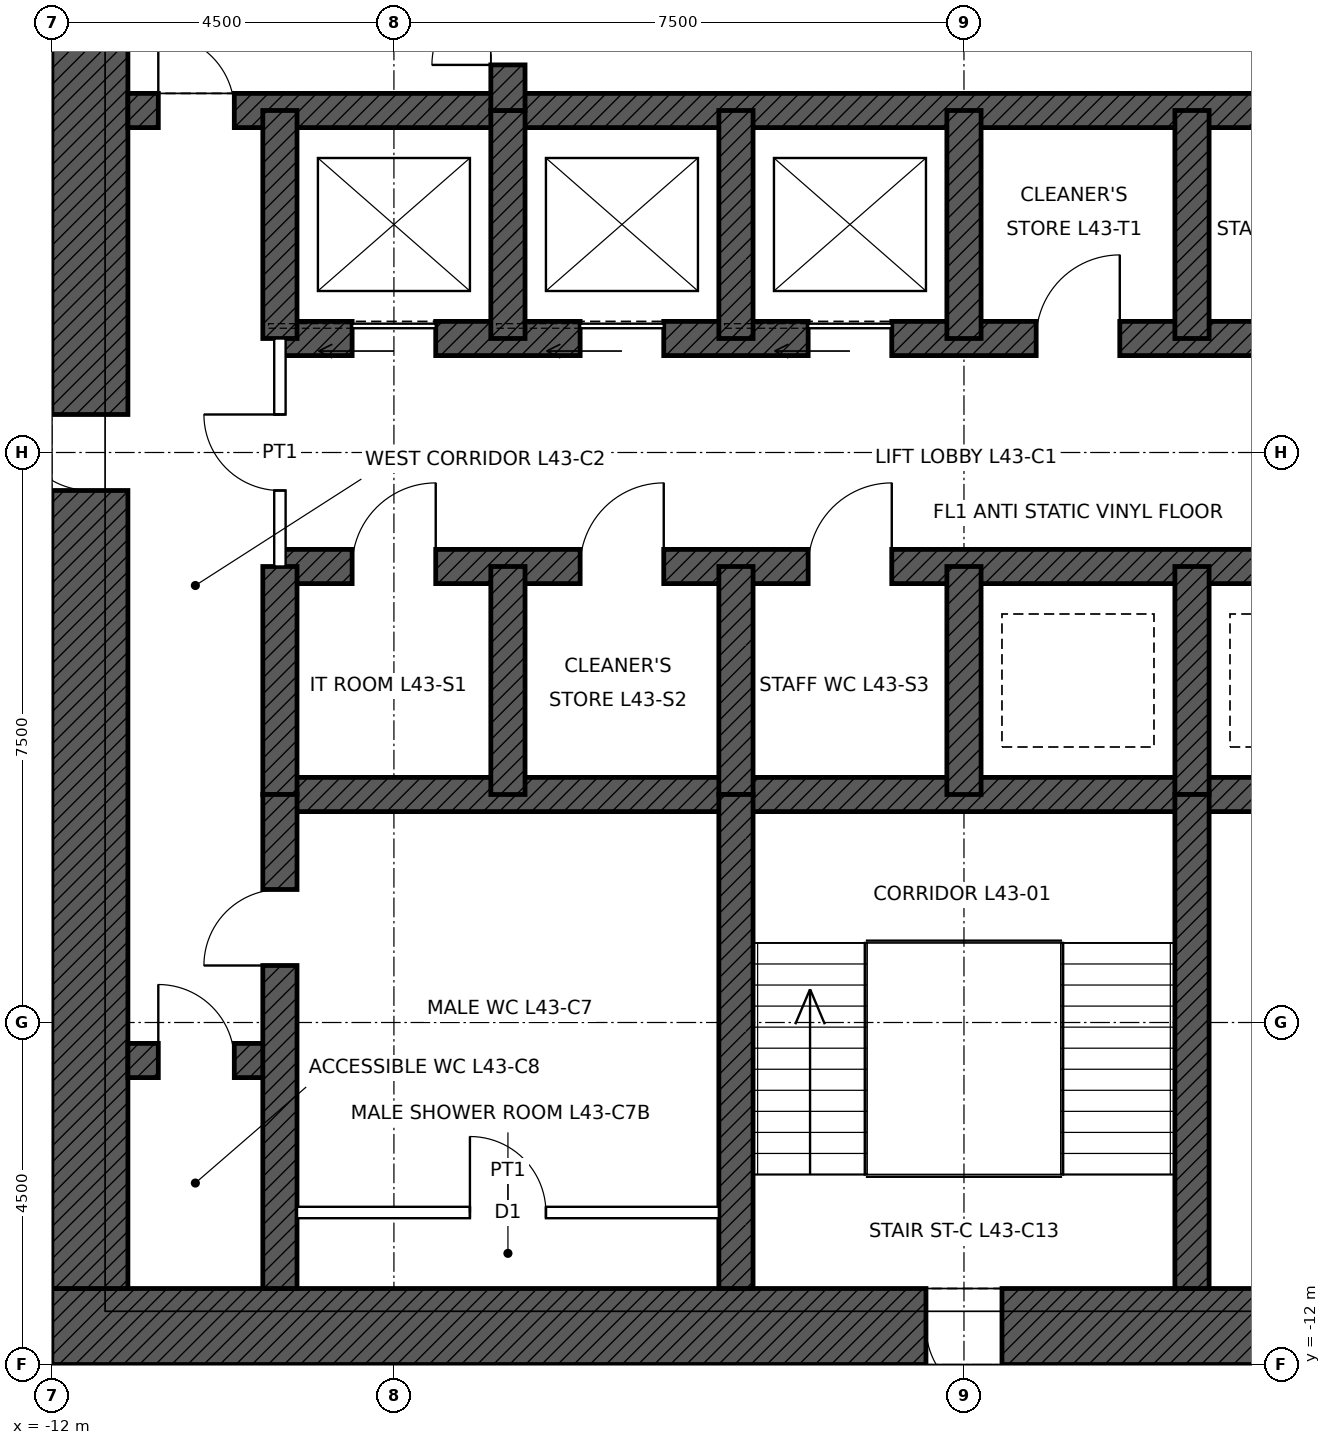
"""IFC4 building model, lengths in metres.
Left out: names, types, materials, properties, quantities, classifications, styles, units other than length and angle.
Written with IfcOpenShell. Run it as: python <this file> out.ifc"""

import sys

from ifc_helpers import new_model, si_unit, direction, frame, frame_2d, origin, place, context, subcontext, project, spatial, rectangle, extrude, element, fill, save


model = new_model("IFC4")
c1 = context("Model", 3, precision=1e-05, world=origin(), true_north=direction((0.0, 1.0)))
c2 = subcontext(c1, "Body", "Model", "MODEL_VIEW")
j1 = project(units=[si_unit("LENGTHUNIT", "METRE"), si_unit("PLANEANGLEUNIT", "RADIAN")], contexts=[c1])
p1 = place(None, origin())
s1 = spatial("IfcSite", under=j1, at=p1, CompositionType="ELEMENT")
p2 = place(p1, origin())
s2 = spatial("IfcBuilding", under=s1, at=p2, CompositionType="ELEMENT")
p3 = place(p2, frame((0.0, 0.0, 205.9)))
s3 = spatial("IfcBuildingStorey", under=s2, at=p3, CompositionType="ELEMENT", Elevation=205.9)
p4 = place(p3, frame((12.0, -11.5, 0.0), z_axis=(0.0, 0.0, 1.0), x_axis=(-1.0, 0.0, 0.0)))
e1 = element("IfcWall", 1, at=p4, inside=s3, PredefinedType="SHEAR", context=c2, shape_type="SweptSolid", body=[
    extrude(rectangle(XDim=24.0, YDim=1.0, at=frame_2d((12.0, 0.0))), origin(), (0.0, 0.0, 1.0), 4.0),
])
p5 = place(p4, frame((11.5, 0.0, 0.0)))
e2 = element("IfcOpeningElement", 2, at=p5, cuts=e1, PredefinedType="OPENING", context=c2, shape_type="SweptSolid", body=[
    extrude(rectangle(XDim=1.0, YDim=2.1, at=frame_2d((0.5, 1.05))), frame((0.0, 0.51, 0.0), z_axis=(0.0, -1.0, 0.0), x_axis=(1.0, 0.0, 0.0)), (0.0, 0.0, 1.0), 1.02),
])
p6 = place(p4, frame((1.0, 0.0, 0.0)))
e3 = element("IfcOpeningElement", 3, at=p6, cuts=e1, PredefinedType="OPENING", context=c2, shape_type="SweptSolid", body=[
    extrude(rectangle(XDim=1.0, YDim=2.4, at=frame_2d((0.5, 1.2))), frame((0.0, 0.51, 0.0), z_axis=(0.0, -1.0, 0.0), x_axis=(1.0, 0.0, 0.0)), (0.0, 0.0, 1.0), 1.02),
])
p7 = place(p3, frame((-11.5, -11.0, 0.0), z_axis=(0.0, 0.0, 1.0), x_axis=(0.0, 1.0, 0.0)))
e4 = element("IfcWall", 4, at=p7, inside=s3, PredefinedType="SHEAR", context=c2, shape_type="SweptSolid", body=[
    extrude(rectangle(XDim=22.0, YDim=1.0, at=frame_2d((11.0, 0.0))), origin(), (0.0, 0.0, 1.0), 4.0),
])
p8 = place(p7, frame((10.5, 0.0, 0.0)))
e5 = element("IfcOpeningElement", 5, at=p8, cuts=e4, PredefinedType="OPENING", context=c2, shape_type="SweptSolid", body=[
    extrude(rectangle(XDim=1.0, YDim=2.4, at=frame_2d((0.5, 1.2))), frame((0.0, 0.51, 0.0), z_axis=(0.0, -1.0, 0.0), x_axis=(1.0, 0.0, 0.0)), (0.0, 0.0, 1.0), 1.02),
])
p9 = place(p3, frame((-11.0, 4.5, 0.0), z_axis=(0.0, 0.0, 1.0), x_axis=(1.0, 0.0, 0.0)))
e6 = element("IfcWall", 6, at=p9, inside=s3, PredefinedType="SHEAR", context=c2, shape_type="SweptSolid", body=[
    extrude(rectangle(XDim=22.0, YDim=0.45, at=frame_2d((11.0, 0.0))), origin(), (0.0, 0.0, 1.0), 4.0),
])
p10 = place(p9, frame((0.4, 0.0, 0.0)))
e7 = element("IfcOpeningElement", 7, at=p10, cuts=e6, PredefinedType="OPENING", context=c2, shape_type="SweptSolid", body=[
    extrude(rectangle(XDim=1.0, YDim=2.1, at=frame_2d((0.5, 1.05))), frame((0.0, 0.235, 0.0), z_axis=(0.0, -1.0, 0.0), x_axis=(1.0, 0.0, 0.0)), (0.0, 0.0, 1.0), 0.47),
])
p11 = place(p9, frame((20.6, 0.0, 0.0)))
e8 = element("IfcOpeningElement", 8, at=p11, cuts=e6, PredefinedType="OPENING", context=c2, shape_type="SweptSolid", body=[
    extrude(rectangle(XDim=1.0, YDim=2.1, at=frame_2d((0.5, 1.05))), frame((0.0, 0.235, 0.0), z_axis=(0.0, -1.0, 0.0), x_axis=(1.0, 0.0, 0.0)), (0.0, 0.0, 1.0), 0.47),
])
p12 = place(p3, frame((-9.0, 1.5, 0.0), z_axis=(0.0, 0.0, 1.0), x_axis=(1.0, 0.0, 0.0)))
e9 = element("IfcWall", 9, at=p12, inside=s3, PredefinedType="SHEAR", context=c2, shape_type="SweptSolid", body=[
    extrude(rectangle(XDim=18.0, YDim=0.45, at=frame_2d((9.0, 0.0))), origin(), (0.0, 0.0, 1.0), 4.0),
])
p13 = place(p12, frame((0.95, 0.0, 0.0)))
e10 = element("IfcOpeningElement", 10, at=p13, cuts=e9, PredefinedType="OPENING", context=c2, shape_type="SweptSolid", body=[
    extrude(rectangle(XDim=1.1, YDim=2.1, at=frame_2d((0.55, 1.05))), frame((0.0, 0.235, 0.0), z_axis=(0.0, -1.0, 0.0), x_axis=(1.0, 0.0, 0.0)), (0.0, 0.0, 1.0), 0.47),
])
p14 = place(p12, frame((3.95, 0.0, 0.0)))
e11 = element("IfcOpeningElement", 11, at=p14, cuts=e9, PredefinedType="OPENING", context=c2, shape_type="SweptSolid", body=[
    extrude(rectangle(XDim=1.1, YDim=2.1, at=frame_2d((0.55, 1.05))), frame((0.0, 0.235, 0.0), z_axis=(0.0, -1.0, 0.0), x_axis=(1.0, 0.0, 0.0)), (0.0, 0.0, 1.0), 0.47),
])
p15 = place(p12, frame((6.95, 0.0, 0.0)))
e12 = element("IfcOpeningElement", 12, at=p15, cuts=e9, PredefinedType="OPENING", context=c2, shape_type="SweptSolid", body=[
    extrude(rectangle(XDim=1.1, YDim=2.1, at=frame_2d((0.55, 1.05))), frame((0.0, 0.235, 0.0), z_axis=(0.0, -1.0, 0.0), x_axis=(1.0, 0.0, 0.0)), (0.0, 0.0, 1.0), 0.47),
])
p16 = place(p12, frame((9.95, 0.0, 0.0)))
e13 = element("IfcOpeningElement", 13, at=p16, cuts=e9, PredefinedType="OPENING", context=c2, shape_type="SweptSolid", body=[
    extrude(rectangle(XDim=1.1, YDim=2.1, at=frame_2d((0.55, 1.05))), frame((0.0, 0.235, 0.0), z_axis=(0.0, -1.0, 0.0), x_axis=(1.0, 0.0, 0.0)), (0.0, 0.0, 1.0), 0.47),
])
p17 = place(p12, frame((12.95, 0.0, 0.0)))
e14 = element("IfcOpeningElement", 14, at=p17, cuts=e9, PredefinedType="OPENING", context=c2, shape_type="SweptSolid", body=[
    extrude(rectangle(XDim=1.1, YDim=2.1, at=frame_2d((0.55, 1.05))), frame((0.0, 0.235, 0.0), z_axis=(0.0, -1.0, 0.0), x_axis=(1.0, 0.0, 0.0)), (0.0, 0.0, 1.0), 0.47),
])
p18 = place(p12, frame((15.95, 0.0, 0.0)))
e15 = element("IfcOpeningElement", 15, at=p18, cuts=e9, PredefinedType="OPENING", context=c2, shape_type="SweptSolid", body=[
    extrude(rectangle(XDim=1.1, YDim=2.1, at=frame_2d((0.55, 1.05))), frame((0.0, 0.235, 0.0), z_axis=(0.0, -1.0, 0.0), x_axis=(1.0, 0.0, 0.0)), (0.0, 0.0, 1.0), 0.47),
])
p19 = place(p3, frame((-9.0, -1.5, 0.0), z_axis=(0.0, 0.0, 1.0), x_axis=(1.0, 0.0, 0.0)))
e16 = element("IfcWall", 16, at=p19, inside=s3, PredefinedType="SHEAR", context=c2, shape_type="SweptSolid", body=[
    extrude(rectangle(XDim=18.0, YDim=0.45, at=frame_2d((9.0, 0.0))), origin(), (0.0, 0.0, 1.0), 4.0),
])
p20 = place(p19, frame((0.95, 0.0, 0.0)))
e17 = element("IfcOpeningElement", 17, at=p20, cuts=e16, PredefinedType="OPENING", context=c2, shape_type="SweptSolid", body=[
    extrude(rectangle(XDim=1.1, YDim=2.1, at=frame_2d((0.55, 1.05))), frame((0.0, 0.235, 0.0), z_axis=(0.0, -1.0, 0.0), x_axis=(1.0, 0.0, 0.0)), (0.0, 0.0, 1.0), 0.47),
])
p21 = place(p19, frame((3.95, 0.0, 0.0)))
e18 = element("IfcOpeningElement", 18, at=p21, cuts=e16, PredefinedType="OPENING", context=c2, shape_type="SweptSolid", body=[
    extrude(rectangle(XDim=1.1, YDim=2.1, at=frame_2d((0.55, 1.05))), frame((0.0, 0.235, 0.0), z_axis=(0.0, -1.0, 0.0), x_axis=(1.0, 0.0, 0.0)), (0.0, 0.0, 1.0), 0.47),
])
p22 = place(p19, frame((6.95, 0.0, 0.0)))
e19 = element("IfcOpeningElement", 19, at=p22, cuts=e16, PredefinedType="OPENING", context=c2, shape_type="SweptSolid", body=[
    extrude(rectangle(XDim=1.1, YDim=2.1, at=frame_2d((0.55, 1.05))), frame((0.0, 0.235, 0.0), z_axis=(0.0, -1.0, 0.0), x_axis=(1.0, 0.0, 0.0)), (0.0, 0.0, 1.0), 0.47),
])
p23 = place(p3, frame((-9.0, -4.5, 0.0), z_axis=(0.0, 0.0, 1.0), x_axis=(1.0, 0.0, 0.0)))
e20 = element("IfcWall", 20, at=p23, inside=s3, PredefinedType="SHEAR", context=c2, shape_type="SweptSolid", body=[
    extrude(rectangle(XDim=18.0, YDim=0.45, at=frame_2d((9.0, 0.0))), origin(), (0.0, 0.0, 1.0), 4.0),
])
p24 = place(p3, frame((-11.0, -8.0, 0.0), z_axis=(0.0, 0.0, 1.0), x_axis=(1.0, 0.0, 0.0)))
e21 = element("IfcWall", 21, at=p24, inside=s3, PredefinedType="SHEAR", context=c2, shape_type="SweptSolid", body=[
    extrude(rectangle(XDim=2.0, YDim=0.45, at=frame_2d((1.0, 0.0))), origin(), (0.0, 0.0, 1.0), 4.0),
])
p25 = place(p24, frame((0.4, 0.0, 0.0)))
e22 = element("IfcOpeningElement", 22, at=p25, cuts=e21, PredefinedType="OPENING", context=c2, shape_type="SweptSolid", body=[
    extrude(rectangle(XDim=1.0, YDim=2.1, at=frame_2d((0.5, 1.05))), frame((0.0, 0.235, 0.0), z_axis=(0.0, -1.0, 0.0), x_axis=(1.0, 0.0, 0.0)), (0.0, 0.0, 1.0), 0.47),
])
for number, where, z_axis, x_axis in (
    (23, (-9.0, 1.5, 0.0), (0.0, 0.0, 1.0), (0.0, 1.0, 0.0)),
    (24, (-9.0, -4.5, 0.0), (0.0, 0.0, 1.0), (0.0, 1.0, 0.0)),
    (25, (-6.0, 1.5, 0.0), (0.0, 0.0, 1.0), (0.0, 1.0, 0.0)),
    (26, (-3.0, 1.5, 0.0), (0.0, 0.0, 1.0), (0.0, 1.0, 0.0)),
    (27, (0.0, 1.5, 0.0), (0.0, 0.0, 1.0), (0.0, 1.0, 0.0)),
    (28, (3.0, 1.5, 0.0), (0.0, 0.0, 1.0), (0.0, 1.0, 0.0)),
    (29, (-6.0, -4.5, 0.0), (0.0, 0.0, 1.0), (0.0, 1.0, 0.0)),
    (30, (-3.0, -4.5, 0.0), (0.0, 0.0, 1.0), (0.0, 1.0, 0.0)),
    (31, (0.0, -4.5, 0.0), (0.0, 0.0, 1.0), (0.0, 1.0, 0.0)),
    (32, (3.0, -4.5, 0.0), (0.0, 0.0, 1.0), (0.0, 1.0, 0.0)),
):
    element("IfcWall", number, at=place(p3, frame(where, z_axis=z_axis, x_axis=x_axis)), inside=s3, PredefinedType="SHEAR", context=c2, shape_type="SweptSolid", body=[
        extrude(rectangle(XDim=3.0, YDim=0.45, at=frame_2d((1.5, 0.0))), origin(), (0.0, 0.0, 1.0), 4.0),
    ])
p26 = place(p3, frame((-6.0, 4.5, 0.0), z_axis=(0.0, 0.0, 1.0), x_axis=(0.0, 1.0, 0.0)))
e33 = element("IfcWall", 33, at=p26, inside=s3, PredefinedType="SHEAR", context=c2, shape_type="SweptSolid", body=[
    extrude(rectangle(XDim=6.5, YDim=0.45, at=frame_2d((3.25, 0.0))), origin(), (0.0, 0.0, 1.0), 4.0),
])
p27 = place(p26, frame((0.6, 0.0, 0.0)))
e34 = element("IfcOpeningElement", 34, at=p27, cuts=e33, PredefinedType="OPENING", context=c2, shape_type="SweptSolid", body=[
    extrude(rectangle(XDim=1.0, YDim=2.1, at=frame_2d((0.5, 1.05))), frame((0.0, 0.235, 0.0), z_axis=(0.0, -1.0, 0.0), x_axis=(1.0, 0.0, 0.0)), (0.0, 0.0, 1.0), 0.47),
])
p28 = place(p3, frame((-9.0, -11.0, 0.0), z_axis=(0.0, 0.0, 1.0), x_axis=(0.0, 1.0, 0.0)))
e35 = element("IfcWall", 35, at=p28, inside=s3, PredefinedType="SHEAR", context=c2, shape_type="SweptSolid", body=[
    extrude(rectangle(XDim=6.5, YDim=0.45, at=frame_2d((3.25, 0.0))), origin(), (0.0, 0.0, 1.0), 4.0),
])
p29 = place(p28, frame((4.25, 0.0, 0.0)))
e36 = element("IfcOpeningElement", 36, at=p29, cuts=e35, PredefinedType="OPENING", context=c2, shape_type="SweptSolid", body=[
    extrude(rectangle(XDim=1.0, YDim=2.1, at=frame_2d((0.5, 1.05))), frame((0.0, 0.235, 0.0), z_axis=(0.0, -1.0, 0.0), x_axis=(1.0, 0.0, 0.0)), (0.0, 0.0, 1.0), 0.47),
])
for number, where, z_axis, x_axis in (
    (37, (-3.0, -11.0, 0.0), (0.0, 0.0, 1.0), (0.0, 1.0, 0.0)),
    (38, (3.0, -11.0, 0.0), (0.0, 0.0, 1.0), (0.0, 1.0, 0.0)),
):
    element("IfcWall", number, at=place(p3, frame(where, z_axis=z_axis, x_axis=x_axis)), inside=s3, PredefinedType="SHEAR", context=c2, shape_type="SweptSolid", body=[
        extrude(rectangle(XDim=6.5, YDim=0.45, at=frame_2d((3.25, 0.0))), origin(), (0.0, 0.0, 1.0), 4.0),
    ])
p30 = place(p3, frame((-8.775, -10.0, 0.0), z_axis=(0.0, 0.0, 1.0), x_axis=(1.0, 0.0, 0.0)))
e39 = element("IfcWall", 39, at=p30, inside=s3, PredefinedType="PARTITIONING", context=c2, shape_type="SweptSolid", body=[
    extrude(rectangle(XDim=5.55, YDim=0.15, at=frame_2d((2.775, 0.0))), origin(), (0.0, 0.0, 1.0), 3.75),
])
p31 = place(p30, frame((2.275, 0.0, 0.0)))
e40 = element("IfcOpeningElement", 40, at=p31, cuts=e39, PredefinedType="OPENING", context=c2, shape_type="SweptSolid", body=[
    extrude(rectangle(XDim=1.0, YDim=2.1, at=frame_2d((0.5, 1.05))), frame((0.0, 0.085, 0.0), z_axis=(0.0, -1.0, 0.0), x_axis=(1.0, 0.0, 0.0)), (0.0, 0.0, 1.0), 0.17),
])
p32 = place(p3, frame((-9.0, -1.5, 0.0), z_axis=(0.0, 0.0, 1.0), x_axis=(0.0, 1.0, 0.0)))
e41 = element("IfcWall", 41, at=p32, inside=s3, PredefinedType="PARTITIONING", context=c2, shape_type="SweptSolid", body=[
    extrude(rectangle(XDim=3.0, YDim=0.15, at=frame_2d((1.5, 0.0))), origin(), (0.0, 0.0, 1.0), 3.75),
])
p33 = place(p32, frame((1.0, 0.0, 0.0)))
e42 = element("IfcOpeningElement", 42, at=p33, cuts=e41, PredefinedType="OPENING", context=c2, shape_type="SweptSolid", body=[
    extrude(rectangle(XDim=1.0, YDim=2.4, at=frame_2d((0.5, 1.2))), frame((0.0, 0.085, 0.0), z_axis=(0.0, -1.0, 0.0), x_axis=(1.0, 0.0, 0.0)), (0.0, 0.0, 1.0), 0.17),
])
p34 = place(p10, origin())
e43 = element("IfcDoor", 43, at=p34, inside=s3, OperationType="SINGLE_SWING_LEFT", PredefinedType="DOOR", context=c2, shape_type="SweptSolid", body=[
    extrude(rectangle(XDim=1.0, YDim=2.1, at=frame_2d((0.5, 1.05))), frame((0.0, 0.025, 0.0), z_axis=(0.0, -1.0, 0.0), x_axis=(1.0, 0.0, 0.0)), (0.0, 0.0, 1.0), 0.05),
])
fill(e7, e43)
p35 = place(p27, origin())
e44 = element("IfcDoor", 44, at=p35, inside=s3, OperationType="SINGLE_SWING_LEFT", PredefinedType="DOOR", context=c2, shape_type="SweptSolid", body=[
    extrude(rectangle(XDim=1.0, YDim=2.1, at=frame_2d((0.5, 1.05))), frame((0.0, 0.025, 0.0), z_axis=(0.0, -1.0, 0.0), x_axis=(1.0, 0.0, 0.0)), (0.0, 0.0, 1.0), 0.05),
])
fill(e34, e44)
p36 = place(p5, origin())
e45 = element("IfcDoor", 45, at=p36, inside=s3, OperationType="SINGLE_SWING_LEFT", PredefinedType="DOOR", context=c2, shape_type="SweptSolid", body=[
    extrude(rectangle(XDim=1.0, YDim=2.1, at=frame_2d((0.5, 1.05))), frame((0.0, 0.485, 0.0), z_axis=(0.0, -1.0, 0.0), x_axis=(1.0, 0.0, 0.0)), (0.0, 0.0, 1.0), 0.05),
])
fill(e2, e45)
p37 = place(p8, origin())
e46 = element("IfcDoor", 46, at=p37, inside=s3, OperationType="SINGLE_SWING_RIGHT", PredefinedType="DOOR", context=c2, shape_type="SweptSolid", body=[
    extrude(rectangle(XDim=1.0, YDim=2.4, at=frame_2d((0.5, 1.2))), frame((0.0, 0.485, 0.0), z_axis=(0.0, -1.0, 0.0), x_axis=(1.0, 0.0, 0.0)), (0.0, 0.0, 1.0), 0.05),
])
fill(e5, e46)
p38 = place(p29, origin())
e47 = element("IfcDoor", 47, at=p38, inside=s3, OperationType="SINGLE_SWING_LEFT", PredefinedType="DOOR", context=c2, shape_type="SweptSolid", body=[
    extrude(rectangle(XDim=1.0, YDim=2.1, at=frame_2d((0.5, 1.05))), frame((0.0, 0.025, 0.0), z_axis=(0.0, -1.0, 0.0), x_axis=(1.0, 0.0, 0.0)), (0.0, 0.0, 1.0), 0.05),
])
fill(e36, e47)
p39 = place(p25, origin())
e48 = element("IfcDoor", 48, at=p39, inside=s3, OperationType="SINGLE_SWING_LEFT", PredefinedType="DOOR", context=c2, shape_type="SweptSolid", body=[
    extrude(rectangle(XDim=1.0, YDim=2.1, at=frame_2d((0.5, 1.05))), frame((0.0, 0.025, 0.0), z_axis=(0.0, -1.0, 0.0), x_axis=(1.0, 0.0, 0.0)), (0.0, 0.0, 1.0), 0.05),
])
fill(e22, e48)
p40 = place(p13, origin())
e49 = element("IfcDoor", 49, at=p40, inside=s3, OperationType="SLIDING_TO_LEFT", PredefinedType="DOOR", context=c2, shape_type="SweptSolid", body=[
    extrude(rectangle(XDim=1.1, YDim=2.1, at=frame_2d((0.55, 1.05))), frame((0.0, 0.025, 0.0), z_axis=(0.0, -1.0, 0.0), x_axis=(1.0, 0.0, 0.0)), (0.0, 0.0, 1.0), 0.05),
])
fill(e10, e49)
p41 = place(p14, origin())
e50 = element("IfcDoor", 50, at=p41, inside=s3, OperationType="SLIDING_TO_LEFT", PredefinedType="DOOR", context=c2, shape_type="SweptSolid", body=[
    extrude(rectangle(XDim=1.1, YDim=2.1, at=frame_2d((0.55, 1.05))), frame((0.0, 0.025, 0.0), z_axis=(0.0, -1.0, 0.0), x_axis=(1.0, 0.0, 0.0)), (0.0, 0.0, 1.0), 0.05),
])
fill(e11, e50)
p42 = place(p15, origin())
e51 = element("IfcDoor", 51, at=p42, inside=s3, OperationType="SLIDING_TO_LEFT", PredefinedType="DOOR", context=c2, shape_type="SweptSolid", body=[
    extrude(rectangle(XDim=1.1, YDim=2.1, at=frame_2d((0.55, 1.05))), frame((0.0, 0.025, 0.0), z_axis=(0.0, -1.0, 0.0), x_axis=(1.0, 0.0, 0.0)), (0.0, 0.0, 1.0), 0.05),
])
fill(e12, e51)
p43 = place(p31, origin())
e52 = element("IfcDoor", 52, at=p43, inside=s3, OperationType="SINGLE_SWING_LEFT", PredefinedType="DOOR", context=c2, shape_type="SweptSolid", body=[
    extrude(rectangle(XDim=1.0, YDim=2.1, at=frame_2d((0.5, 1.05))), frame((0.0, 0.025, 0.0), z_axis=(0.0, -1.0, 0.0), x_axis=(1.0, 0.0, 0.0)), (0.0, 0.0, 1.0), 0.05),
])
fill(e40, e52)
p44 = place(p33, origin())
e53 = element("IfcDoor", 53, at=p44, inside=s3, OperationType="SINGLE_SWING_RIGHT", PredefinedType="DOOR", context=c2, shape_type="SweptSolid", body=[
    extrude(rectangle(XDim=1.0, YDim=2.4, at=frame_2d((0.5, 1.2))), frame((0.0, 0.025, 0.0), z_axis=(0.0, -1.0, 0.0), x_axis=(1.0, 0.0, 0.0)), (0.0, 0.0, 1.0), 0.05),
])
fill(e42, e53)
p45 = place(p16, origin())
e54 = element("IfcDoor", 54, at=p45, inside=s3, OperationType="SINGLE_SWING_RIGHT", PredefinedType="DOOR", context=c2, shape_type="SweptSolid", body=[
    extrude(rectangle(XDim=1.1, YDim=2.1, at=frame_2d((0.55, 1.05))), frame((0.0, 0.025, 0.0), z_axis=(0.0, -1.0, 0.0), x_axis=(1.0, 0.0, 0.0)), (0.0, 0.0, 1.0), 0.05),
])
fill(e13, e54)
p46 = place(p20, origin())
e55 = element("IfcDoor", 55, at=p46, inside=s3, OperationType="SINGLE_SWING_RIGHT", PredefinedType="DOOR", context=c2, shape_type="SweptSolid", body=[
    extrude(rectangle(XDim=1.1, YDim=2.1, at=frame_2d((0.55, 1.05))), frame((0.0, 0.025, 0.0), z_axis=(0.0, -1.0, 0.0), x_axis=(1.0, 0.0, 0.0)), (0.0, 0.0, 1.0), 0.05),
])
fill(e17, e55)
p47 = place(p21, origin())
e56 = element("IfcDoor", 56, at=p47, inside=s3, OperationType="SINGLE_SWING_RIGHT", PredefinedType="DOOR", context=c2, shape_type="SweptSolid", body=[
    extrude(rectangle(XDim=1.1, YDim=2.1, at=frame_2d((0.55, 1.05))), frame((0.0, 0.025, 0.0), z_axis=(0.0, -1.0, 0.0), x_axis=(1.0, 0.0, 0.0)), (0.0, 0.0, 1.0), 0.05),
])
fill(e18, e56)
p48 = place(p22, origin())
e57 = element("IfcDoor", 57, at=p48, inside=s3, OperationType="SINGLE_SWING_RIGHT", PredefinedType="DOOR", context=c2, shape_type="SweptSolid", body=[
    extrude(rectangle(XDim=1.1, YDim=2.1, at=frame_2d((0.55, 1.05))), frame((0.0, 0.025, 0.0), z_axis=(0.0, -1.0, 0.0), x_axis=(1.0, 0.0, 0.0)), (0.0, 0.0, 1.0), 0.05),
])
fill(e19, e57)
save(model, sys.argv[1])
